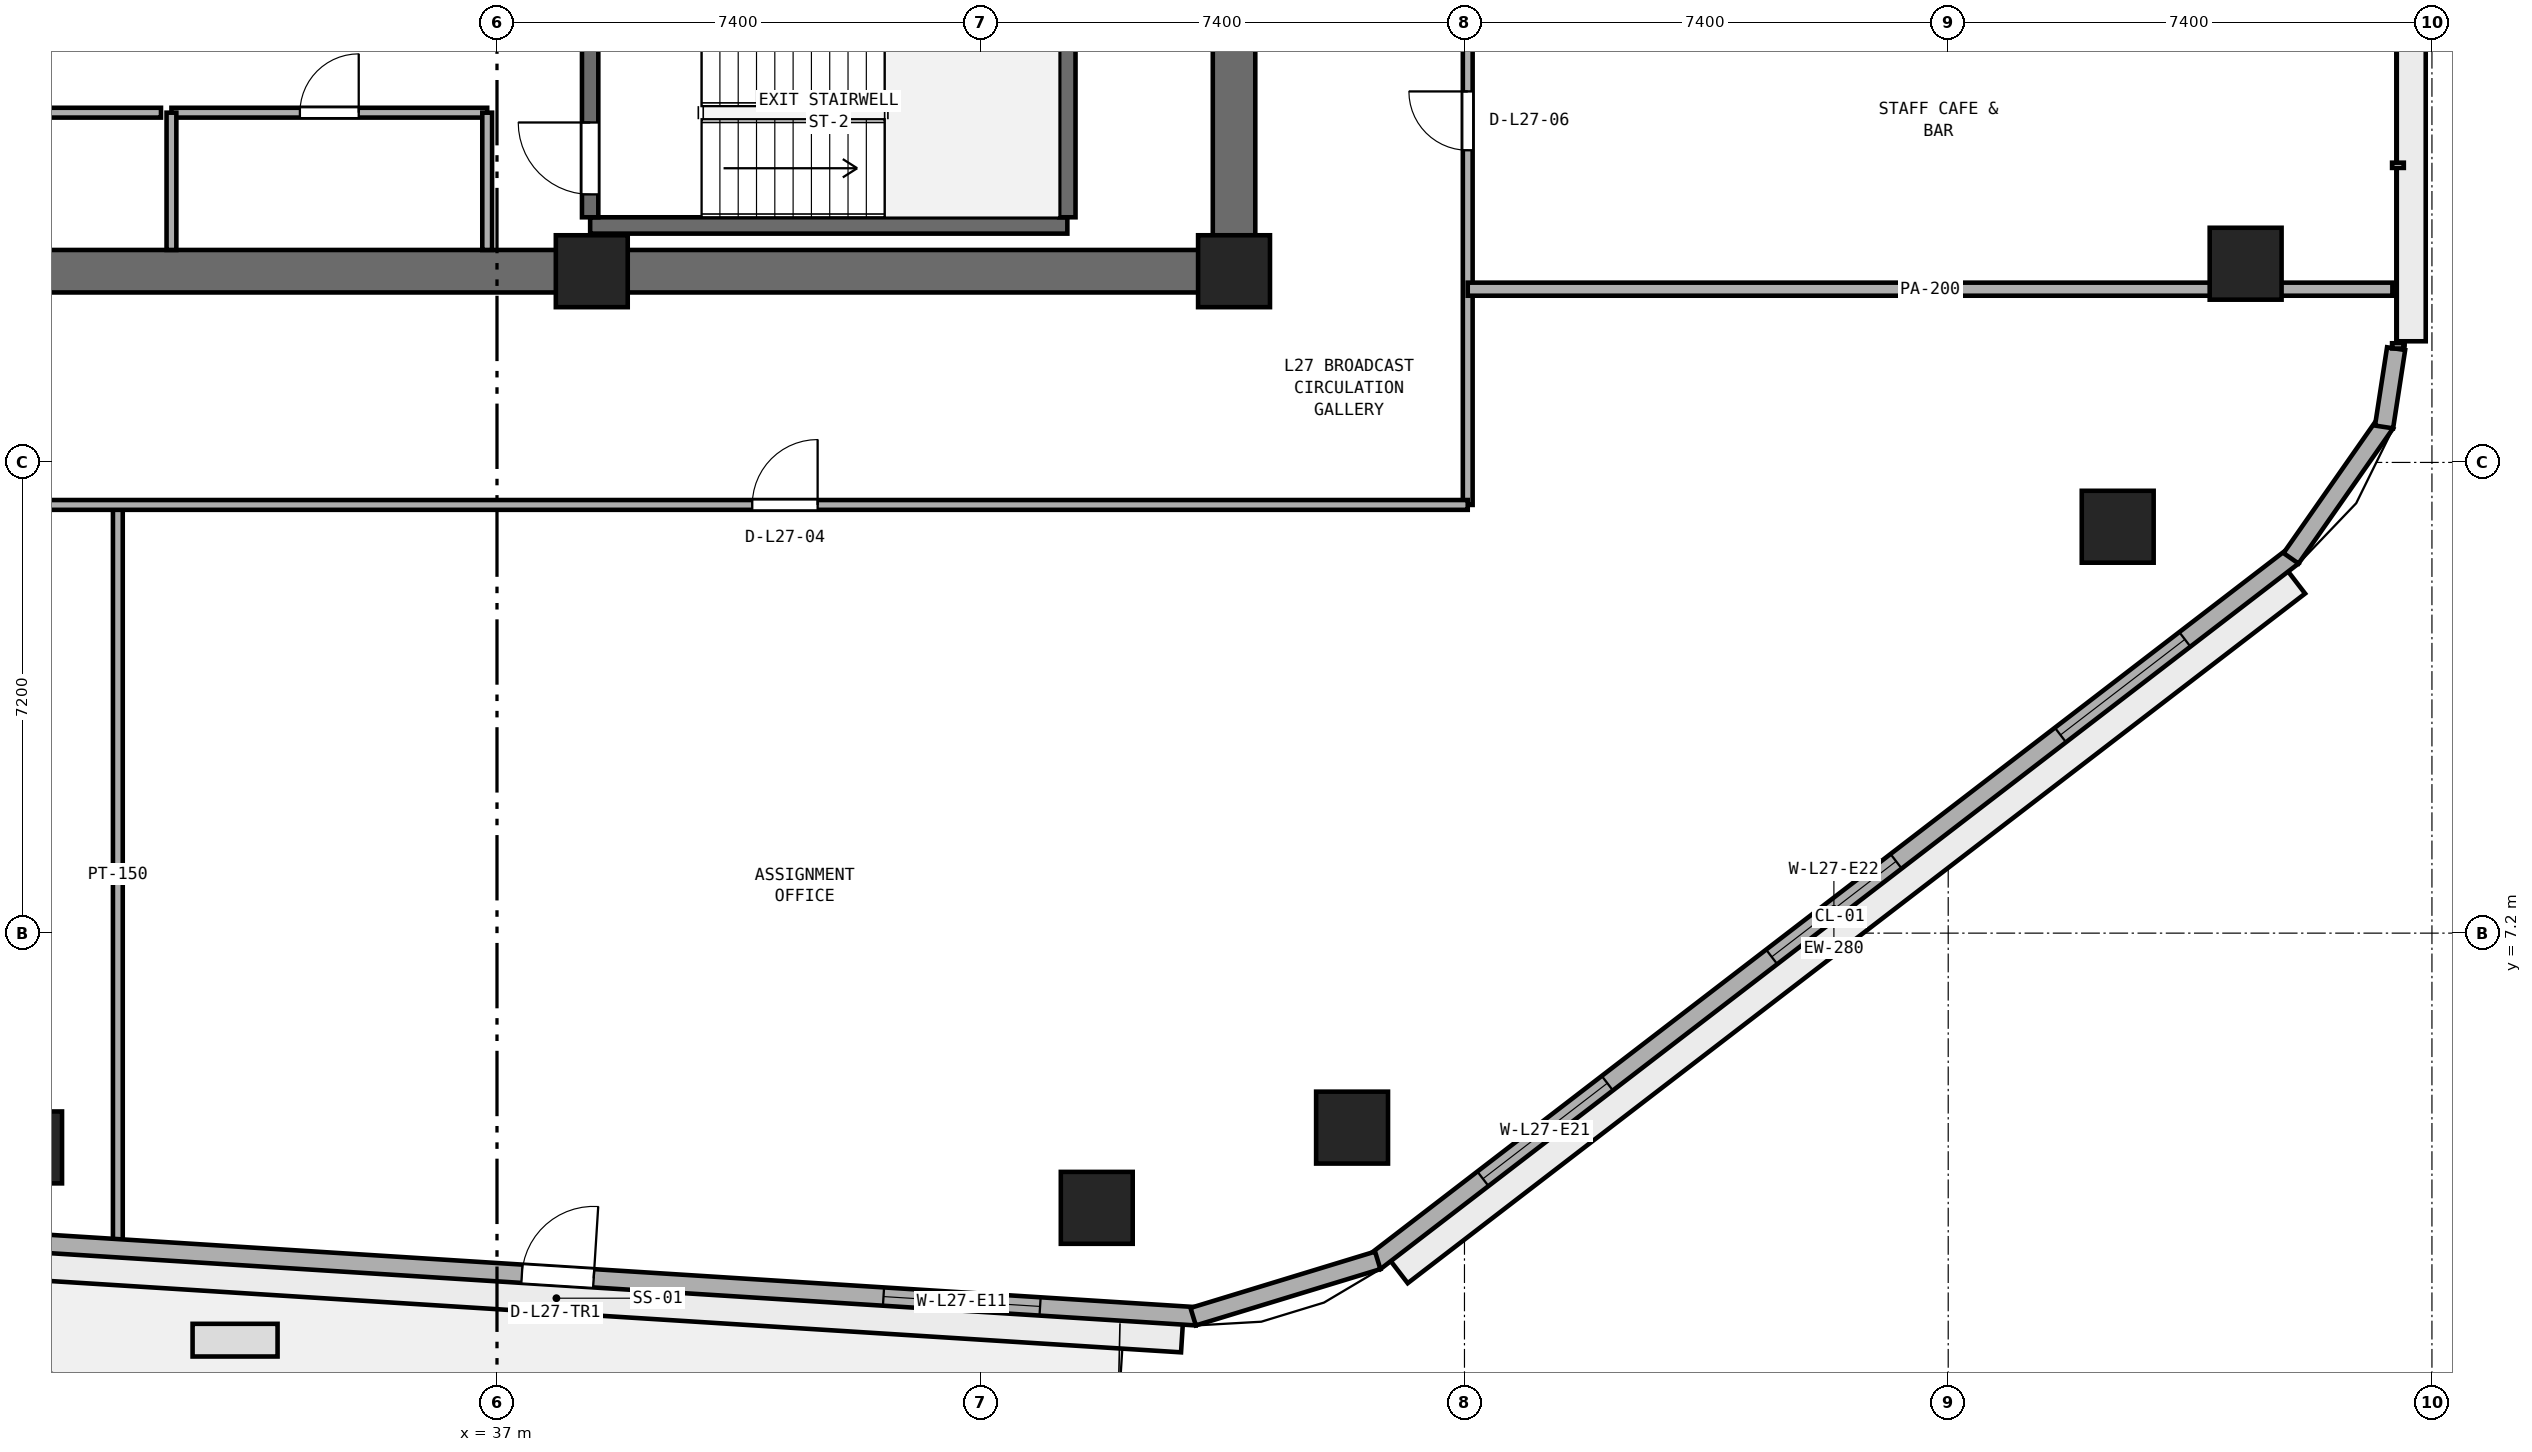
"""IFC4 building model, lengths in metres.
Left out: names, types, materials, properties, quantities, classifications, styles, units other than length and angle.
Written with IfcOpenShell. Run it as: python <this file> out.ifc"""

import sys

from ifc_helpers import new_model, si_unit, direction, frame, frame_2d, origin, origin_2d, place, context, subcontext, project, spatial, rectangle, extrude, element, fill, save


model = new_model("IFC4")
c1 = context("Model", 3, precision=1e-05, world=origin(), true_north=direction((0.0, 1.0)))
c2 = subcontext(c1, "Body", "Model", "MODEL_VIEW")
j1 = project(units=[si_unit("LENGTHUNIT", "METRE"), si_unit("PLANEANGLEUNIT", "RADIAN")], contexts=[c1])
p1 = place(None, origin())
s1 = spatial("IfcSite", under=j1, at=p1, CompositionType="ELEMENT")
p2 = place(p1, origin())
s2 = spatial("IfcBuilding", under=s1, at=p2, CompositionType="ELEMENT")
p3 = place(p2, frame((0.0, 0.0, 108.6)))
s3 = spatial("IfcBuildingStorey", under=s2, at=p3, CompositionType="ELEMENT", Elevation=108.6)
p4 = place(p3, frame((25.4, 17.325, 0.0), z_axis=(0.0, 0.0, 1.0), x_axis=(1.0, 0.0, 0.0)))
e1 = element("IfcWall", 1, at=p4, inside=s3, PredefinedType="SHEAR", context=c2, shape_type="SweptSolid", body=[
    extrude(rectangle(XDim=23.2, YDim=0.65, at=frame_2d((11.6, 0.0))), origin(), (0.0, 0.0, 1.0), 3.525),
])
p5 = place(p3, frame((48.275, 17.65, 0.0), z_axis=(0.0, 0.0, 1.0), x_axis=(0.0, 1.0, 0.0)))
e2 = element("IfcWall", 2, at=p5, inside=s3, PredefinedType="SHEAR", context=c2, shape_type="SweptSolid", body=[
    extrude(rectangle(XDim=15.1, YDim=0.65, at=frame_2d((7.55, 0.0))), origin(), (0.0, 0.0, 1.0), 3.525),
])
p6 = place(p5, frame((5.65, 0.0, 0.0)))
e3 = element("IfcOpeningElement", 3, at=p6, cuts=e2, PredefinedType="OPENING", context=c2, shape_type="SweptSolid", body=[
    extrude(rectangle(XDim=1.5, YDim=2.15, at=frame_2d((0.75, 1.075))), frame((0.0, 0.335, 0.0), z_axis=(0.0, -1.0, 0.0), x_axis=(1.0, 0.0, 0.0)), (0.0, 0.0, 1.0), 0.67),
])
for number, where, z_axis, x_axis in (
    (4, (38.45, 17.325, 0.0), (0.0, 0.0, 1.0), (1.0, 0.0, 0.0)),
    (5, (48.275, 17.325, 0.0), (0.0, 0.0, 1.0), (1.0, 0.0, 0.0)),
):
    element("IfcColumn", number, at=place(p3, frame(where, z_axis=z_axis, x_axis=x_axis)), inside=s3, PredefinedType="PILASTER", context=c2, shape_type="SweptSolid", body=[
        extrude(rectangle(XDim=1.1, YDim=1.1, at=origin_2d()), origin(), (0.0, 0.0, 1.0), 3.8),
    ])
for number, where, z_axis, x_axis in (
    (6, (29.796, 3.922, 0.0), (0.0, 0.0, 1.0), (1.0, 0.0, 0.0)),
    (7, (46.175, 2.998, 0.0), (0.0, 0.0, 1.0), (1.0, 0.0, 0.0)),
    (8, (50.081, 4.225, 0.0), (0.0, 0.0, 1.0), (1.0, 0.0, 0.0)),
    (9, (61.793, 13.416, 0.0), (0.0, 0.0, 1.0), (1.0, 0.0, 0.0)),
    (10, (63.75, 17.44, 0.0), (0.0, 0.0, 1.0), (1.0, 0.0, 0.0)),
):
    element("IfcColumn", number, at=place(p3, frame(where, z_axis=z_axis, x_axis=x_axis)), inside=s3, PredefinedType="COLUMN", context=c2, shape_type="SweptSolid", body=[
        extrude(rectangle(XDim=1.1, YDim=1.1, at=origin_2d()), origin(), (0.0, 0.0, 1.0), 3.8),
    ])
p7 = place(p3, frame((38.425, 18.025, 0.0), z_axis=(0.0, 0.0, 1.0), x_axis=(1.0, 0.0, 0.0)))
e11 = element("IfcWall", 11, at=p7, inside=s3, PredefinedType="SHEAR", context=c2, shape_type="SweptSolid", body=[
    extrude(rectangle(XDim=7.3, YDim=0.25, at=frame_2d((3.65, 0.0))), origin(), (0.0, 0.0, 1.0), 3.525),
])
p8 = place(p3, frame((38.425, 18.15, 0.0), z_axis=(0.0, 0.0, 1.0), x_axis=(0.0, 1.0, 0.0)))
e12 = element("IfcWall", 12, at=p8, inside=s3, PredefinedType="SHEAR", context=c2, shape_type="SweptSolid", body=[
    extrude(rectangle(XDim=3.2, YDim=0.25, at=frame_2d((1.6, 0.0))), origin(), (0.0, 0.0, 1.0), 3.525),
])
p9 = place(p8, frame((0.35, 0.0, 0.0)))
e13 = element("IfcOpeningElement", 13, at=p9, cuts=e12, PredefinedType="OPENING", context=c2, shape_type="SweptSolid", body=[
    extrude(rectangle(XDim=1.1, YDim=2.15, at=frame_2d((0.55, 1.075))), frame((0.0, 0.135, 0.0), z_axis=(0.0, -1.0, 0.0), x_axis=(1.0, 0.0, 0.0)), (0.0, 0.0, 1.0), 0.27),
])
p10 = place(p3, frame((45.725, 18.15, 0.0), z_axis=(0.0, 0.0, 1.0), x_axis=(0.0, 1.0, 0.0)))
e14 = element("IfcWall", 14, at=p10, inside=s3, PredefinedType="SHEAR", context=c2, shape_type="SweptSolid", body=[
    extrude(rectangle(XDim=3.2, YDim=0.25, at=frame_2d((1.6, 0.0))), origin(), (0.0, 0.0, 1.0), 3.525),
])
p11 = place(p3, frame((26.17, 19.75, 0.0), z_axis=(0.0, 0.0, 1.0), x_axis=(1.0, 0.0, 0.0)))
e15 = element("IfcWall", 15, at=p11, inside=s3, PredefinedType="PARTITIONING", context=c2, shape_type="SweptSolid", body=[
    extrude(rectangle(XDim=5.69, YDim=0.15, at=frame_2d((2.845, 0.0))), origin(), (0.0, 0.0, 1.0), 3.525),
])
p12 = place(p11, frame((2.37, 0.0, 0.0)))
e16 = element("IfcOpeningElement", 16, at=p12, cuts=e15, PredefinedType="OPENING", context=c2, shape_type="SweptSolid", body=[
    extrude(rectangle(XDim=0.95, YDim=2.1, at=frame_2d((0.475, 1.05))), frame((0.0, 0.085, 0.0), z_axis=(0.0, -1.0, 0.0), x_axis=(1.0, 0.0, 0.0)), (0.0, 0.0, 1.0), 0.17),
])
p13 = place(p3, frame((32.02, 19.75, 0.0), z_axis=(0.0, 0.0, 1.0), x_axis=(1.0, 0.0, 0.0)))
e17 = element("IfcWall", 17, at=p13, inside=s3, PredefinedType="PARTITIONING", context=c2, shape_type="SweptSolid", body=[
    extrude(rectangle(XDim=4.83, YDim=0.15, at=frame_2d((2.415, 0.0))), origin(), (0.0, 0.0, 1.0), 3.525),
])
p14 = place(p13, frame((1.965, 0.0, 0.0)))
e18 = element("IfcOpeningElement", 18, at=p14, cuts=e17, PredefinedType="OPENING", context=c2, shape_type="SweptSolid", body=[
    extrude(rectangle(XDim=0.9, YDim=2.1, at=frame_2d((0.45, 1.05))), frame((0.0, 0.085, 0.0), z_axis=(0.0, -1.0, 0.0), x_axis=(1.0, 0.0, 0.0)), (0.0, 0.0, 1.0), 0.17),
])
for number, where, z_axis, x_axis in (
    (19, (32.02, 17.65, 0.0), (0.0, 0.0, 1.0), (0.0, 1.0, 0.0)),
    (20, (36.85, 17.65, 0.0), (0.0, 0.0, 1.0), (0.0, 1.0, 0.0)),
):
    element("IfcWall", number, at=place(p3, frame(where, z_axis=z_axis, x_axis=x_axis)), inside=s3, PredefinedType="PARTITIONING", context=c2, shape_type="SweptSolid", body=[
        extrude(rectangle(XDim=2.1, YDim=0.15, at=frame_2d((1.05, 0.0))), origin(), (0.0, 0.0, 1.0), 3.525),
    ])
p15 = place(p3, frame((51.85, 13.75, 0.0), z_axis=(0.0, 0.0, 1.0), x_axis=(0.0, 1.0, 0.0)))
e21 = element("IfcWall", 21, at=p15, inside=s3, PredefinedType="PARTITIONING", context=c2, shape_type="SweptSolid", body=[
    extrude(rectangle(XDim=33.644, YDim=0.15, at=frame_2d((16.822, 0.0))), origin(), (0.0, 0.0, 1.0), 3.525),
])
p16 = place(p15, frame((5.425, 0.0, 0.0)))
e22 = element("IfcOpeningElement", 22, at=p16, cuts=e21, PredefinedType="OPENING", context=c2, shape_type="SweptSolid", body=[
    extrude(rectangle(XDim=0.9, YDim=2.1, at=frame_2d((0.45, 1.05))), frame((0.0, 0.085, 0.0), z_axis=(0.0, -1.0, 0.0), x_axis=(1.0, 0.0, 0.0)), (0.0, 0.0, 1.0), 0.17),
])
p17 = place(p15, frame((15.225, 0.0, 0.0)))
e23 = element("IfcOpeningElement", 23, at=p17, cuts=e21, PredefinedType="OPENING", context=c2, shape_type="SweptSolid", body=[
    extrude(rectangle(XDim=0.9, YDim=2.1, at=frame_2d((0.45, 1.05))), frame((0.0, 0.085, 0.0), z_axis=(0.0, -1.0, 0.0), x_axis=(1.0, 0.0, 0.0)), (0.0, 0.0, 1.0), 0.17),
])
p18 = place(p3, frame((31.2, 2.444, 0.0), z_axis=(0.0, 0.0, 1.0), x_axis=(0.0, 1.0, 0.0)))
e24 = element("IfcWall", 24, at=p18, inside=s3, PredefinedType="PARTITIONING", context=c2, shape_type="SweptSolid", body=[
    extrude(rectangle(XDim=11.306, YDim=0.15, at=frame_2d((5.653, 0.0))), origin(), (0.0, 0.0, 1.0), 3.525),
])
p19 = place(p3, frame((22.15, 13.75, 0.0), z_axis=(0.0, 0.0, 1.0), x_axis=(1.0, 0.0, 0.0)))
e25 = element("IfcWall", 25, at=p19, inside=s3, PredefinedType="PARTITIONING", context=c2, shape_type="SweptSolid", body=[
    extrude(rectangle(XDim=29.7, YDim=0.15, at=frame_2d((14.85, 0.0))), origin(), (0.0, 0.0, 1.0), 3.525),
])
p20 = place(p19, frame((4.145, 0.0, 0.0)))
e26 = element("IfcOpeningElement", 26, at=p20, cuts=e25, PredefinedType="OPENING", context=c2, shape_type="SweptSolid", body=[
    extrude(rectangle(XDim=1.0, YDim=2.12, at=frame_2d((0.5, 1.06))), frame((0.0, 0.085, 0.0), z_axis=(0.0, -1.0, 0.0), x_axis=(1.0, 0.0, 0.0)), (0.0, 0.0, 1.0), 0.17),
])
p21 = place(p19, frame((18.755, 0.0, 0.0)))
e27 = element("IfcOpeningElement", 27, at=p21, cuts=e25, PredefinedType="OPENING", context=c2, shape_type="SweptSolid", body=[
    extrude(rectangle(XDim=1.0, YDim=2.12, at=frame_2d((0.5, 1.06))), frame((0.0, 0.085, 0.0), z_axis=(0.0, -1.0, 0.0), x_axis=(1.0, 0.0, 0.0)), (0.0, 0.0, 1.0), 0.17),
])
p22 = place(p3, frame((51.85, 17.05, 0.0), z_axis=(0.0, 0.0, 1.0), x_axis=(1.0, 0.0, 0.0)))
e28 = element("IfcWall", 28, at=p22, inside=s3, PredefinedType="PARTITIONING", context=c2, shape_type="SweptSolid", body=[
    extrude(rectangle(XDim=14.145, YDim=0.2, at=frame_2d((7.073, 0.0))), origin(), (0.0, 0.0, 1.0), 3.525),
])
p23 = place(p3, frame((28.161, 2.571, 0.0), z_axis=(0.0, 0.0, 1.0), x_axis=(0.998017288298, -0.06294038654, 0.0)))
e29 = element("IfcWall", 29, at=p23, inside=s3, PredefinedType="STANDARD", context=c2, shape_type="SweptSolid", body=[
    extrude(rectangle(XDim=19.577, YDim=0.28, at=frame_2d((9.789, 0.0))), origin(), (0.0, 0.0, 1.0), 3.525),
])
p24 = place(p23, frame((9.239, 0.0, 0.0)))
e30 = element("IfcOpeningElement", 30, at=p24, cuts=e29, PredefinedType="OPENING", context=c2, shape_type="SweptSolid", body=[
    extrude(rectangle(XDim=1.1, YDim=2.2, at=frame_2d((0.55, 1.1))), frame((0.0, 0.15, 0.0), z_axis=(0.0, -1.0, 0.0), x_axis=(1.0, 0.0, 0.0)), (0.0, 0.0, 1.0), 0.3),
])
p25 = place(p23, frame((14.781, 0.0, 0.9)))
e31 = element("IfcOpeningElement", 31, at=p25, cuts=e29, PredefinedType="OPENING", context=c2, shape_type="SweptSolid", body=[
    extrude(rectangle(XDim=2.4, YDim=1.75, at=frame_2d((1.2, 0.875))), frame((0.0, 0.15, 0.0), z_axis=(0.0, -1.0, 0.0), x_axis=(1.0, 0.0, 0.0)), (0.0, 0.0, 1.0), 0.3),
])
p26 = place(p3, frame((50.429, 2.172, 0.0), z_axis=(0.0, 0.0, 1.0), x_axis=(0.792937466367, 0.609303023488, 0.0)))
e32 = element("IfcWall", 32, at=p26, inside=s3, PredefinedType="STANDARD", context=c2, shape_type="SweptSolid", body=[
    extrude(rectangle(XDim=17.713, YDim=0.28, at=frame_2d((8.856, 0.0))), origin(), (0.0, 0.0, 1.0), 3.525),
])
p27 = place(p26, frame((2.085, 0.0, 0.9)))
e33 = element("IfcOpeningElement", 33, at=p27, cuts=e32, PredefinedType="OPENING", context=c2, shape_type="SweptSolid", body=[
    extrude(rectangle(XDim=2.4, YDim=1.75, at=frame_2d((1.2, 0.875))), frame((0.0, 0.15, 0.0), z_axis=(0.0, -1.0, 0.0), x_axis=(1.0, 0.0, 0.0)), (0.0, 0.0, 1.0), 0.3),
])
p28 = place(p26, frame((7.656, 0.0, 0.9)))
e34 = element("IfcOpeningElement", 34, at=p28, cuts=e32, PredefinedType="OPENING", context=c2, shape_type="SweptSolid", body=[
    extrude(rectangle(XDim=2.4, YDim=1.75, at=frame_2d((1.2, 0.875))), frame((0.0, 0.15, 0.0), z_axis=(0.0, -1.0, 0.0), x_axis=(1.0, 0.0, 0.0)), (0.0, 0.0, 1.0), 0.3),
])
p29 = place(p26, frame((13.227, 0.0, 0.9)))
e35 = element("IfcOpeningElement", 35, at=p29, cuts=e32, PredefinedType="OPENING", context=c2, shape_type="SweptSolid", body=[
    extrude(rectangle(XDim=2.4, YDim=1.75, at=frame_2d((1.2, 0.875))), frame((0.0, 0.15, 0.0), z_axis=(0.0, -1.0, 0.0), x_axis=(1.0, 0.0, 0.0)), (0.0, 0.0, 1.0), 0.3),
])
p30 = place(p3, frame((47.65, 1.333, 0.0), z_axis=(0.0, 0.0, 1.0), x_axis=(0.956461287977, 0.291859220516, 0.0)))
e36 = element("IfcWall", 36, at=p30, inside=s3, PredefinedType="STANDARD", context=c2, shape_type="SweptSolid", body=[
    extrude(rectangle(XDim=2.952, YDim=0.28, at=frame_2d((1.476, 0.0))), origin(), (0.0, 0.0, 1.0), 3.525),
])
p31 = place(p3, frame((64.444, 12.933, 0.0), z_axis=(0.0, 0.0, 1.0), x_axis=(0.573176686443, 0.819431806875, 0.0)))
e37 = element("IfcWall", 37, at=p31, inside=s3, PredefinedType="STANDARD", context=c2, shape_type="SweptSolid", body=[
    extrude(rectangle(XDim=2.524, YDim=0.28, at=frame_2d((1.262, 0.0))), origin(), (0.0, 0.0, 1.0), 3.525),
])
p32 = place(p3, frame((65.867, 14.943, 0.0), z_axis=(0.0, 0.0, 1.0), x_axis=(0.152102600021, 0.988364709541, 0.0)))
e38 = element("IfcWall", 38, at=p32, inside=s3, PredefinedType="STANDARD", context=c2, shape_type="SweptSolid", body=[
    extrude(rectangle(XDim=1.212, YDim=0.28, at=frame_2d((0.606, 0.0))), origin(), (0.0, 0.0, 1.0), 3.525),
])
p33 = place(p9, origin())
e39 = element("IfcDoor", 39, at=p33, inside=s3, OperationType="SINGLE_SWING_RIGHT", PredefinedType="DOOR", context=c2, shape_type="SweptSolid", body=[
    extrude(rectangle(XDim=1.1, YDim=2.15, at=frame_2d((0.55, 1.075))), frame((0.0, 0.025, 0.0), z_axis=(0.0, -1.0, 0.0), x_axis=(1.0, 0.0, 0.0)), (0.0, 0.0, 1.0), 0.05),
])
fill(e13, e39)
p34 = place(p14, origin())
e40 = element("IfcDoor", 40, at=p34, inside=s3, OperationType="SINGLE_SWING_RIGHT", PredefinedType="DOOR", context=c2, shape_type="SweptSolid", body=[
    extrude(rectangle(XDim=0.9, YDim=2.1, at=frame_2d((0.45, 1.05))), frame((0.0, 0.025, 0.0), z_axis=(0.0, -1.0, 0.0), x_axis=(1.0, 0.0, 0.0)), (0.0, 0.0, 1.0), 0.05),
])
fill(e18, e40)
p35 = place(p21, origin())
e41 = element("IfcDoor", 41, at=p35, inside=s3, OperationType="SINGLE_SWING_RIGHT", PredefinedType="DOOR", context=c2, shape_type="SweptSolid", body=[
    extrude(rectangle(XDim=1.0, YDim=2.12, at=frame_2d((0.5, 1.06))), frame((0.0, 0.025, 0.0), z_axis=(0.0, -1.0, 0.0), x_axis=(1.0, 0.0, 0.0)), (0.0, 0.0, 1.0), 0.05),
])
fill(e27, e41)
p36 = place(p16, origin())
e42 = element("IfcDoor", 42, at=p36, inside=s3, OperationType="SINGLE_SWING_RIGHT", PredefinedType="DOOR", context=c2, shape_type="SweptSolid", body=[
    extrude(rectangle(XDim=0.9, YDim=2.1, at=frame_2d((0.45, 1.05))), frame((0.0, 0.025, 0.0), z_axis=(0.0, -1.0, 0.0), x_axis=(1.0, 0.0, 0.0)), (0.0, 0.0, 1.0), 0.05),
])
fill(e22, e42)
p37 = place(p24, origin())
e43 = element("IfcDoor", 43, at=p37, inside=s3, OperationType="SINGLE_SWING_RIGHT", PredefinedType="DOOR", context=c2, shape_type="SweptSolid", body=[
    extrude(rectangle(XDim=1.1, YDim=2.2, at=frame_2d((0.55, 1.1))), frame((0.0, 0.025, 0.0), z_axis=(0.0, -1.0, 0.0), x_axis=(1.0, 0.0, 0.0)), (0.0, 0.0, 1.0), 0.05),
])
fill(e30, e43)
p38 = place(p25, origin())
e44 = element("IfcWindow", 44, at=p38, inside=s3, PartitioningType="SINGLE_PANEL", PredefinedType="WINDOW", context=c2, shape_type="SweptSolid", body=[
    extrude(rectangle(XDim=2.4, YDim=1.75, at=frame_2d((1.2, 0.875))), frame((0.0, 0.03, 0.0), z_axis=(0.0, -1.0, 0.0), x_axis=(1.0, 0.0, 0.0)), (0.0, 0.0, 1.0), 0.06),
])
fill(e31, e44)
p39 = place(p27, origin())
e45 = element("IfcWindow", 45, at=p39, inside=s3, PartitioningType="SINGLE_PANEL", PredefinedType="WINDOW", context=c2, shape_type="SweptSolid", body=[
    extrude(rectangle(XDim=2.4, YDim=1.75, at=frame_2d((1.2, 0.875))), frame((0.0, 0.03, 0.0), z_axis=(0.0, -1.0, 0.0), x_axis=(1.0, 0.0, 0.0)), (0.0, 0.0, 1.0), 0.06),
])
fill(e33, e45)
p40 = place(p28, origin())
e46 = element("IfcWindow", 46, at=p40, inside=s3, PartitioningType="SINGLE_PANEL", PredefinedType="WINDOW", context=c2, shape_type="SweptSolid", body=[
    extrude(rectangle(XDim=2.4, YDim=1.75, at=frame_2d((1.2, 0.875))), frame((0.0, 0.03, 0.0), z_axis=(0.0, -1.0, 0.0), x_axis=(1.0, 0.0, 0.0)), (0.0, 0.0, 1.0), 0.06),
])
fill(e34, e46)
p41 = place(p29, origin())
e47 = element("IfcWindow", 47, at=p41, inside=s3, PartitioningType="SINGLE_PANEL", PredefinedType="WINDOW", context=c2, shape_type="SweptSolid", body=[
    extrude(rectangle(XDim=2.4, YDim=1.75, at=frame_2d((1.2, 0.875))), frame((0.0, 0.03, 0.0), z_axis=(0.0, -1.0, 0.0), x_axis=(1.0, 0.0, 0.0)), (0.0, 0.0, 1.0), 0.06),
])
fill(e35, e47)
save(model, sys.argv[1])
